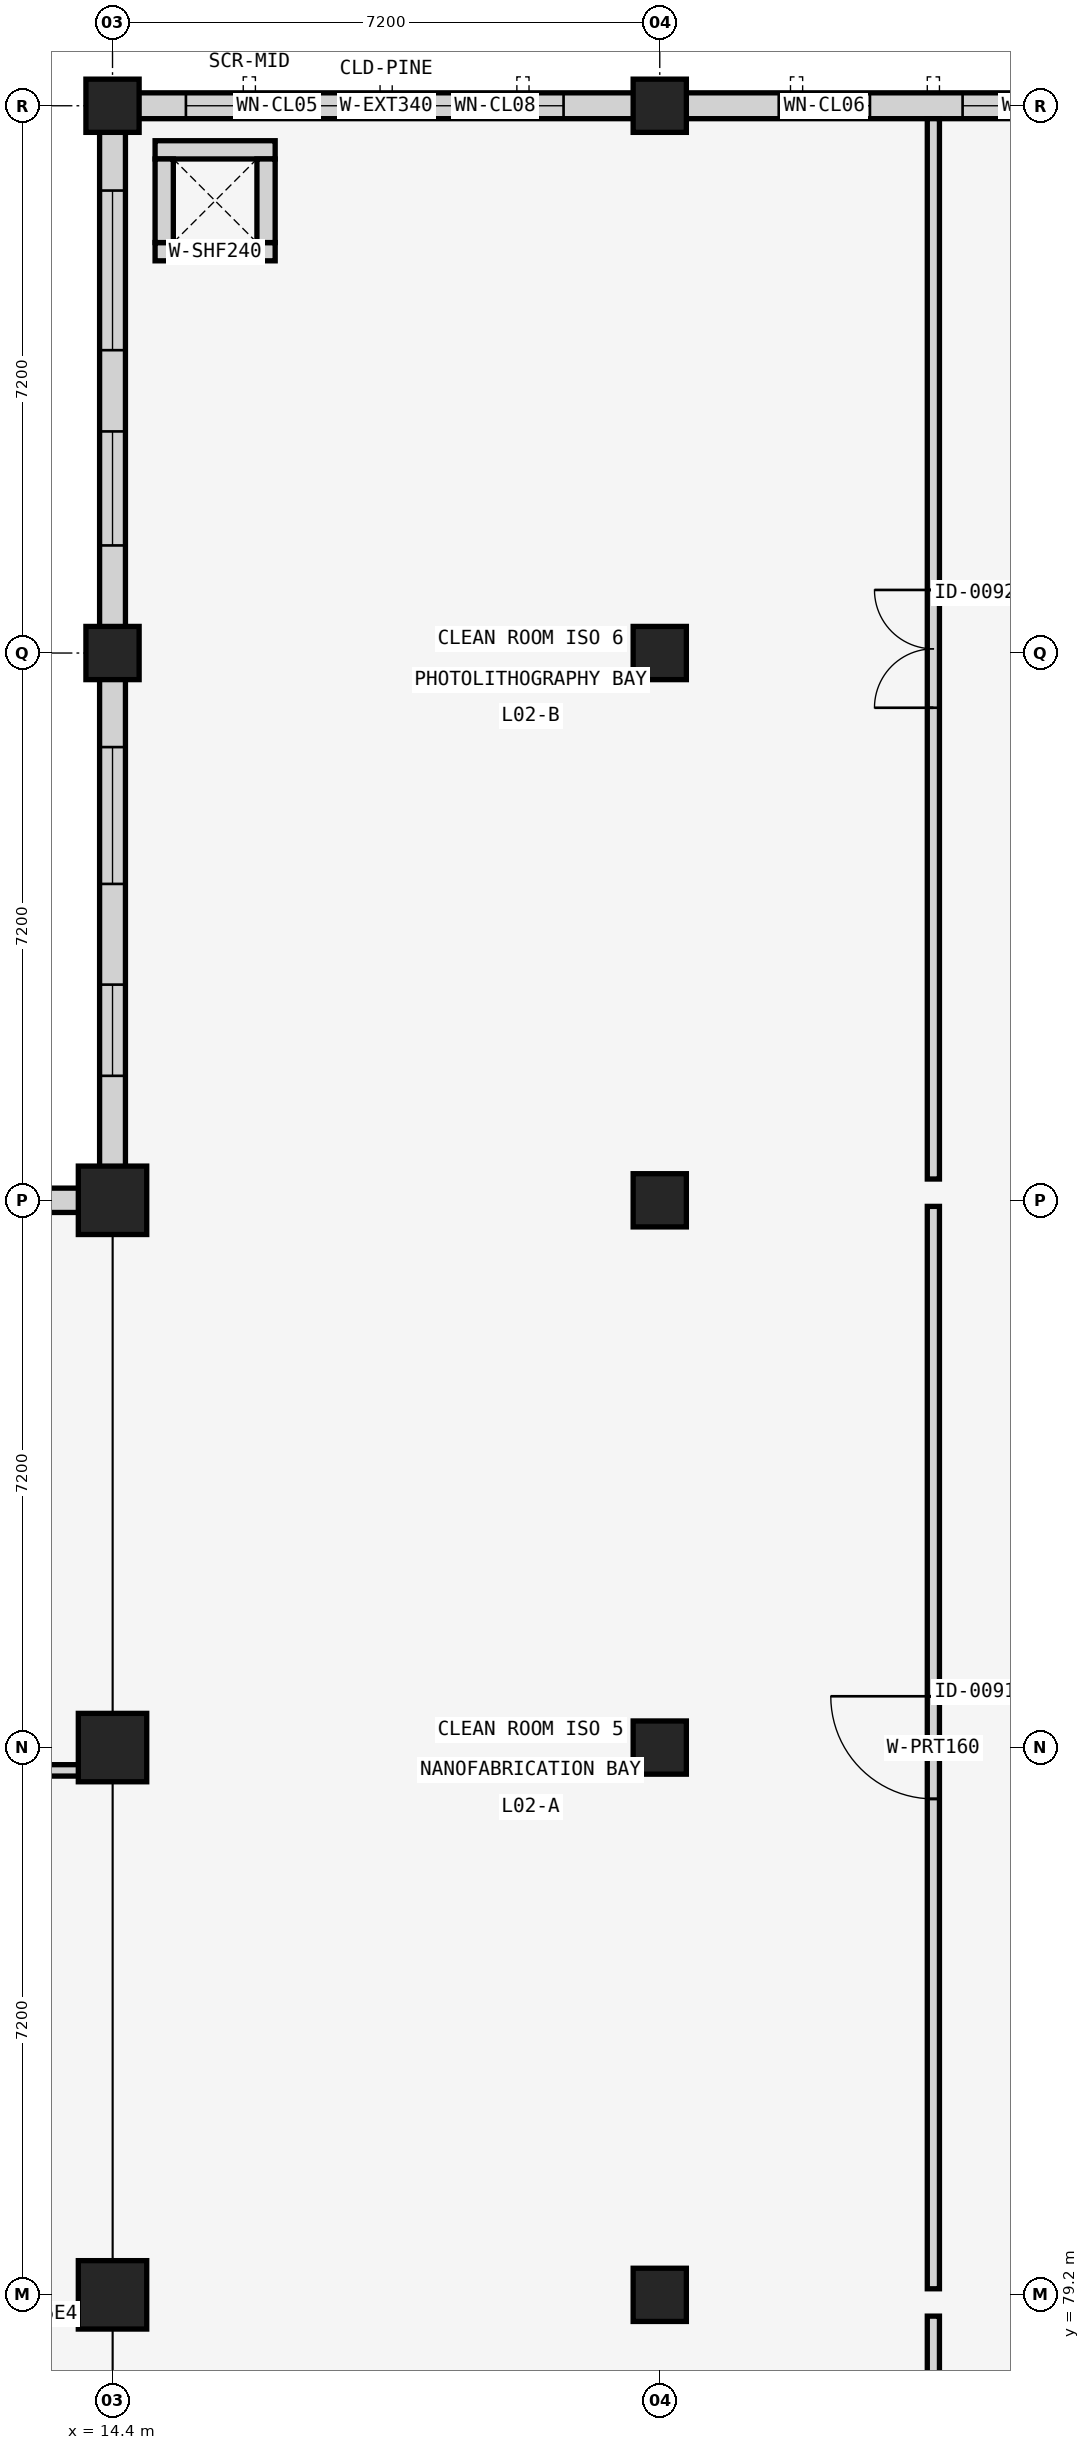
"""IFC4 building model, lengths in metres.
Left out: names, types, materials, properties, quantities, classifications, styles, units other than length and angle.
Written with IfcOpenShell. Run it as: python <this file> out.ifc"""

import sys

from ifc_helpers import new_model, si_unit, direction, frame, frame_2d, origin, origin_2d, place, context, subcontext, project, spatial, rectangle, extrude, element, fill, save


model = new_model("IFC4")
c1 = context("Model", 3, precision=1e-05, world=origin(), true_north=direction((0.0, 1.0)))
c2 = subcontext(c1, "Body", "Model", "MODEL_VIEW")
j1 = project(units=[si_unit("LENGTHUNIT", "METRE"), si_unit("PLANEANGLEUNIT", "RADIAN")], contexts=[c1])
p1 = place(None, origin())
s1 = spatial("IfcSite", under=j1, at=p1, CompositionType="ELEMENT")
p2 = place(p1, origin())
s2 = spatial("IfcBuilding", under=s1, at=p2, CompositionType="ELEMENT")
p3 = place(p2, frame((0.0, 0.0, 8.96)))
s3 = spatial("IfcBuildingStorey", under=s2, at=p3, CompositionType="ELEMENT", Elevation=8.96)
for number, where, z_axis, x_axis in (
    (1, (14.4, 79.2, 0.0), (0.0, 0.0, 1.0), (1.0, 0.0, 0.0)),
    (2, (14.4, 86.4, 0.0), (0.0, 0.0, 1.0), (1.0, 0.0, 0.0)),
    (3, (14.4, 93.6, 0.0), (0.0, 0.0, 1.0), (1.0, 0.0, 0.0)),
):
    element("IfcColumn", number, at=place(p3, frame(where, z_axis=z_axis, x_axis=x_axis)), inside=s3, PredefinedType="COLUMN", context=c2, shape_type="SweptSolid", body=[
        extrude(rectangle(XDim=0.9, YDim=0.9, at=origin_2d()), origin(), (0.0, 0.0, 1.0), 4.16),
    ])
for number, where, z_axis, x_axis in (
    (4, (14.4, 100.8, 0.0), (0.0, 0.0, 1.0), (1.0, 0.0, 0.0)),
    (5, (14.4, 108.0, 0.0), (0.0, 0.0, 1.0), (1.0, 0.0, 0.0)),
    (6, (21.6, 79.2, 0.0), (0.0, 0.0, 1.0), (1.0, 0.0, 0.0)),
    (7, (21.6, 86.4, 0.0), (0.0, 0.0, 1.0), (1.0, 0.0, 0.0)),
    (8, (21.6, 93.6, 0.0), (0.0, 0.0, 1.0), (1.0, 0.0, 0.0)),
    (9, (21.6, 100.8, 0.0), (0.0, 0.0, 1.0), (1.0, 0.0, 0.0)),
    (10, (21.6, 108.0, 0.0), (0.0, 0.0, 1.0), (1.0, 0.0, 0.0)),
):
    element("IfcColumn", number, at=place(p3, frame(where, z_axis=z_axis, x_axis=x_axis)), inside=s3, PredefinedType="COLUMN", context=c2, shape_type="SweptSolid", body=[
        extrude(rectangle(XDim=0.7, YDim=0.7, at=origin_2d()), origin(), (0.0, 0.0, 1.0), 4.16),
    ])
p4 = place(p3, frame((0.44, 93.6, 0.0), z_axis=(0.0, 0.0, 1.0), x_axis=(1.0, 0.0, 0.0)))
e11 = element("IfcWall", 11, at=p4, inside=s3, PredefinedType="SOLIDWALL", context=c2, shape_type="SweptSolid", body=[
    extrude(rectangle(XDim=13.52, YDim=0.32, at=frame_2d((6.76, 0.0))), origin(), (0.0, 0.0, 1.0), 3.42),
])
p5 = place(p4, frame((2.175, 0.0, 0.85)))
e12 = element("IfcOpeningElement", 12, at=p5, cuts=e11, PredefinedType="OPENING", context=c2, shape_type="SweptSolid", body=[
    extrude(rectangle(XDim=0.45, YDim=2.1, at=frame_2d((0.225, 1.05))), frame((0.0, 0.17, 0.0), z_axis=(0.0, -1.0, 0.0), x_axis=(1.0, 0.0, 0.0)), (0.0, 0.0, 1.0), 0.34),
])
p6 = place(p4, frame((4.975, 0.0, 0.85)))
e13 = element("IfcOpeningElement", 13, at=p6, cuts=e11, PredefinedType="OPENING", context=c2, shape_type="SweptSolid", body=[
    extrude(rectangle(XDim=0.45, YDim=2.4, at=frame_2d((0.225, 1.2))), frame((0.0, 0.17, 0.0), z_axis=(0.0, -1.0, 0.0), x_axis=(1.0, 0.0, 0.0)), (0.0, 0.0, 1.0), 0.34),
])
p7 = place(p4, frame((8.95, 0.0, 0.85)))
e14 = element("IfcOpeningElement", 14, at=p7, cuts=e11, PredefinedType="OPENING", context=c2, shape_type="SweptSolid", body=[
    extrude(rectangle(XDim=0.5, YDim=2.4, at=frame_2d((0.25, 1.2))), frame((0.0, 0.17, 0.0), z_axis=(0.0, -1.0, 0.0), x_axis=(1.0, 0.0, 0.0)), (0.0, 0.0, 1.0), 0.34),
])
p8 = place(p4, frame((11.725, 0.0, 0.85)))
e15 = element("IfcOpeningElement", 15, at=p8, cuts=e11, PredefinedType="OPENING", context=c2, shape_type="SweptSolid", body=[
    extrude(rectangle(XDim=0.55, YDim=2.2, at=frame_2d((0.275, 1.1))), frame((0.0, 0.17, 0.0), z_axis=(0.0, -1.0, 0.0), x_axis=(1.0, 0.0, 0.0)), (0.0, 0.0, 1.0), 0.34),
])
p9 = place(p3, frame((14.74, 108.0, 0.0), z_axis=(0.0, 0.0, 1.0), x_axis=(1.0, 0.0, 0.0)))
e16 = element("IfcWall", 16, at=p9, inside=s3, PredefinedType="SOLIDWALL", context=c2, shape_type="SweptSolid", body=[
    extrude(rectangle(XDim=6.52, YDim=0.34, at=frame_2d((3.26, 0.0))), origin(), (0.0, 0.0, 1.0), 3.42),
])
p10 = place(p9, frame((0.625, 0.0, 1.0)))
e17 = element("IfcOpeningElement", 17, at=p10, cuts=e16, PredefinedType="OPENING", context=c2, shape_type="SweptSolid", body=[
    extrude(rectangle(XDim=2.4, YDim=1.5, at=frame_2d((1.2, 0.75))), frame((0.0, 0.18, 0.0), z_axis=(0.0, -1.0, 0.0), x_axis=(1.0, 0.0, 0.0)), (0.0, 0.0, 1.0), 0.36),
])
p11 = place(p9, frame((3.794, 0.0, 1.0)))
e18 = element("IfcOpeningElement", 18, at=p11, cuts=e16, PredefinedType="OPENING", context=c2, shape_type="SweptSolid", body=[
    extrude(rectangle(XDim=1.8, YDim=1.65, at=frame_2d((0.9, 0.825))), frame((0.0, 0.18, 0.0), z_axis=(0.0, -1.0, 0.0), x_axis=(1.0, 0.0, 0.0)), (0.0, 0.0, 1.0), 0.36),
])
p12 = place(p3, frame((21.94, 108.0, 0.0), z_axis=(0.0, 0.0, 1.0), x_axis=(1.0, 0.0, 0.0)))
e19 = element("IfcWall", 19, at=p12, inside=s3, PredefinedType="SOLIDWALL", context=c2, shape_type="SweptSolid", body=[
    extrude(rectangle(XDim=6.52, YDim=0.34, at=frame_2d((3.26, 0.0))), origin(), (0.0, 0.0, 1.0), 3.21),
])
p13 = place(p12, frame((1.226, 0.0, 1.0)))
e20 = element("IfcOpeningElement", 20, at=p13, cuts=e19, PredefinedType="OPENING", context=c2, shape_type="SweptSolid", body=[
    extrude(rectangle(XDim=1.2, YDim=1.65, at=frame_2d((0.6, 0.825))), frame((0.0, 0.18, 0.0), z_axis=(0.0, -1.0, 0.0), x_axis=(1.0, 0.0, 0.0)), (0.0, 0.0, 1.0), 0.36),
])
p14 = place(p12, frame((3.644, 0.0, 1.0)))
e21 = element("IfcOpeningElement", 21, at=p14, cuts=e19, PredefinedType="OPENING", context=c2, shape_type="SweptSolid", body=[
    extrude(rectangle(XDim=2.1, YDim=1.65, at=frame_2d((1.05, 0.825))), frame((0.0, 0.18, 0.0), z_axis=(0.0, -1.0, 0.0), x_axis=(1.0, 0.0, 0.0)), (0.0, 0.0, 1.0), 0.36),
])
p15 = place(p3, frame((14.4, 94.04, 0.0), z_axis=(0.0, 0.0, 1.0), x_axis=(0.0, 1.0, 0.0)))
e22 = element("IfcWall", 22, at=p15, inside=s3, PredefinedType="SOLIDWALL", context=c2, shape_type="SweptSolid", body=[
    extrude(rectangle(XDim=6.42, YDim=0.34, at=frame_2d((3.21, 0.0))), origin(), (0.0, 0.0, 1.0), 3.21),
])
p16 = place(p15, frame((1.198, 0.0, 1.0)))
e23 = element("IfcOpeningElement", 23, at=p16, cuts=e22, PredefinedType="OPENING", context=c2, shape_type="SweptSolid", body=[
    extrude(rectangle(XDim=1.2, YDim=1.65, at=frame_2d((0.6, 0.825))), frame((0.0, 0.18, 0.0), z_axis=(0.0, -1.0, 0.0), x_axis=(1.0, 0.0, 0.0)), (0.0, 0.0, 1.0), 0.36),
])
p17 = place(p15, frame((3.722, 0.0, 1.0)))
e24 = element("IfcOpeningElement", 24, at=p17, cuts=e22, PredefinedType="OPENING", context=c2, shape_type="SweptSolid", body=[
    extrude(rectangle(XDim=1.8, YDim=1.65, at=frame_2d((0.9, 0.825))), frame((0.0, 0.18, 0.0), z_axis=(0.0, -1.0, 0.0), x_axis=(1.0, 0.0, 0.0)), (0.0, 0.0, 1.0), 0.36),
])
p18 = place(p3, frame((14.4, 101.14, 0.0), z_axis=(0.0, 0.0, 1.0), x_axis=(0.0, 1.0, 0.0)))
e25 = element("IfcWall", 25, at=p18, inside=s3, PredefinedType="SOLIDWALL", context=c2, shape_type="SweptSolid", body=[
    extrude(rectangle(XDim=6.52, YDim=0.34, at=frame_2d((3.26, 0.0))), origin(), (0.0, 0.0, 1.0), 3.21),
])
p19 = place(p18, frame((1.076, 0.0, 1.0)))
e26 = element("IfcOpeningElement", 26, at=p19, cuts=e25, PredefinedType="OPENING", context=c2, shape_type="SweptSolid", body=[
    extrude(rectangle(XDim=1.5, YDim=1.65, at=frame_2d((0.75, 0.825))), frame((0.0, 0.18, 0.0), z_axis=(0.0, -1.0, 0.0), x_axis=(1.0, 0.0, 0.0)), (0.0, 0.0, 1.0), 0.36),
])
p20 = place(p18, frame((3.644, 0.0, 1.0)))
e27 = element("IfcOpeningElement", 27, at=p20, cuts=e25, PredefinedType="OPENING", context=c2, shape_type="SweptSolid", body=[
    extrude(rectangle(XDim=2.1, YDim=1.65, at=frame_2d((1.05, 0.825))), frame((0.0, 0.18, 0.0), z_axis=(0.0, -1.0, 0.0), x_axis=(1.0, 0.0, 0.0)), (0.0, 0.0, 1.0), 0.36),
])
p21 = place(p3, frame((0.25, 86.1, 0.0), z_axis=(0.0, 0.0, 1.0), x_axis=(1.0, 0.0, 0.0)))
e28 = element("IfcWall", 28, at=p21, inside=s3, PredefinedType="PARTITIONING", context=c2, shape_type="SweptSolid", body=[
    extrude(rectangle(XDim=13.925, YDim=0.15, at=frame_2d((6.962, 0.0))), origin(), (0.0, 0.0, 1.0), 3.21),
])
p22 = place(p21, frame((4.074, 0.0, 0.0)))
e29 = element("IfcOpeningElement", 29, at=p22, cuts=e28, PredefinedType="OPENING", context=c2, shape_type="SweptSolid", body=[
    extrude(rectangle(XDim=1.6, YDim=2.25, at=frame_2d((0.8, 1.125))), frame((0.0, 0.085, 0.0), z_axis=(0.0, -1.0, 0.0), x_axis=(1.0, 0.0, 0.0)), (0.0, 0.0, 1.0), 0.17),
])
p23 = place(p3, frame((25.2, 65.18, 0.0), z_axis=(0.0, 0.0, 1.0), x_axis=(0.0, 1.0, 0.0)))
e30 = element("IfcWall", 30, at=p23, inside=s3, PredefinedType="PARTITIONING", context=c2, shape_type="SweptSolid", body=[
    extrude(rectangle(XDim=13.74, YDim=0.16, at=frame_2d((6.87, 0.0))), origin(), (0.0, 0.0, 1.0), 3.16),
])
p24 = place(p23, frame((6.27, 0.0, 0.0)))
e31 = element("IfcOpeningElement", 31, at=p24, cuts=e30, PredefinedType="OPENING", context=c2, shape_type="SweptSolid", body=[
    extrude(rectangle(XDim=1.2, YDim=2.15, at=frame_2d((0.6, 1.075))), frame((0.0, 0.09, 0.0), z_axis=(0.0, -1.0, 0.0), x_axis=(1.0, 0.0, 0.0)), (0.0, 0.0, 1.0), 0.18),
])
p25 = place(p3, frame((25.2, 79.28, 0.0), z_axis=(0.0, 0.0, 1.0), x_axis=(0.0, 1.0, 0.0)))
e32 = element("IfcWall", 32, at=p25, inside=s3, PredefinedType="PARTITIONING", context=c2, shape_type="SweptSolid", body=[
    extrude(rectangle(XDim=14.24, YDim=0.16, at=frame_2d((7.12, 0.0))), origin(), (0.0, 0.0, 1.0), 3.16),
])
p26 = place(p25, frame((6.445, 0.0, 0.0)))
e33 = element("IfcOpeningElement", 33, at=p26, cuts=e32, PredefinedType="OPENING", context=c2, shape_type="SweptSolid", body=[
    extrude(rectangle(XDim=1.35, YDim=2.2, at=frame_2d((0.675, 1.1))), frame((0.0, 0.09, 0.0), z_axis=(0.0, -1.0, 0.0), x_axis=(1.0, 0.0, 0.0)), (0.0, 0.0, 1.0), 0.18),
])
p27 = place(p3, frame((25.2, 93.88, 0.0), z_axis=(0.0, 0.0, 1.0), x_axis=(0.0, 1.0, 0.0)))
e34 = element("IfcWall", 34, at=p27, inside=s3, PredefinedType="PARTITIONING", context=c2, shape_type="SweptSolid", body=[
    extrude(rectangle(XDim=13.95, YDim=0.16, at=frame_2d((6.975, 0.0))), origin(), (0.0, 0.0, 1.0), 3.16),
])
p28 = place(p27, frame((6.2, 0.0, 0.0)))
e35 = element("IfcOpeningElement", 35, at=p28, cuts=e34, PredefinedType="OPENING", context=c2, shape_type="SweptSolid", body=[
    extrude(rectangle(XDim=1.55, YDim=2.25, at=frame_2d((0.775, 1.125))), frame((0.0, 0.09, 0.0), z_axis=(0.0, -1.0, 0.0), x_axis=(1.0, 0.0, 0.0)), (0.0, 0.0, 1.0), 0.18),
])
for number, where, z_axis, x_axis in (
    (36, (14.96, 106.08, 0.0), (0.0, 0.0, 1.0), (1.0, 0.0, 0.0)),
    (37, (14.96, 107.42, 0.0), (0.0, 0.0, 1.0), (1.0, 0.0, 0.0)),
):
    element("IfcWall", number, at=place(p3, frame(where, z_axis=z_axis, x_axis=x_axis)), inside=s3, PredefinedType="SOLIDWALL", context=c2, shape_type="SweptSolid", body=[
        extrude(rectangle(XDim=1.58, YDim=0.24, at=frame_2d((0.79, 0.0))), origin(), (0.0, 0.0, 1.0), 3.81),
    ])
for number, where, z_axis, x_axis in (
    (38, (15.08, 106.2, 0.0), (0.0, 0.0, 1.0), (0.0, 1.0, 0.0)),
    (39, (16.42, 106.2, 0.0), (0.0, 0.0, 1.0), (0.0, 1.0, 0.0)),
):
    element("IfcWall", number, at=place(p3, frame(where, z_axis=z_axis, x_axis=x_axis)), inside=s3, PredefinedType="SOLIDWALL", context=c2, shape_type="SweptSolid", body=[
        extrude(rectangle(XDim=1.1, YDim=0.24, at=frame_2d((0.55, 0.0))), origin(), (0.0, 0.0, 1.0), 3.81),
    ])
p29 = place(p10, origin())
e40 = element("IfcWindow", 40, at=p29, inside=s3, PartitioningType="SINGLE_PANEL", PredefinedType="WINDOW", context=c2, shape_type="SweptSolid", body=[
    extrude(rectangle(XDim=2.4, YDim=1.5, at=frame_2d((1.2, 0.75))), frame((0.0, 0.03, 0.0), z_axis=(0.0, -1.0, 0.0), x_axis=(1.0, 0.0, 0.0)), (0.0, 0.0, 1.0), 0.06),
])
fill(e17, e40)
p30 = place(p11, origin())
e41 = element("IfcWindow", 41, at=p30, inside=s3, PartitioningType="SINGLE_PANEL", PredefinedType="WINDOW", context=c2, shape_type="SweptSolid", body=[
    extrude(rectangle(XDim=1.8, YDim=1.65, at=frame_2d((0.9, 0.825))), frame((0.0, 0.03, 0.0), z_axis=(0.0, -1.0, 0.0), x_axis=(1.0, 0.0, 0.0)), (0.0, 0.0, 1.0), 0.06),
])
fill(e18, e41)
p31 = place(p13, origin())
e42 = element("IfcWindow", 42, at=p31, inside=s3, PartitioningType="SINGLE_PANEL", PredefinedType="WINDOW", context=c2, shape_type="SweptSolid", body=[
    extrude(rectangle(XDim=1.2, YDim=1.65, at=frame_2d((0.6, 0.825))), frame((0.0, 0.03, 0.0), z_axis=(0.0, -1.0, 0.0), x_axis=(1.0, 0.0, 0.0)), (0.0, 0.0, 1.0), 0.06),
])
fill(e20, e42)
p32 = place(p14, origin())
e43 = element("IfcWindow", 43, at=p32, inside=s3, PartitioningType="SINGLE_PANEL", PredefinedType="WINDOW", context=c2, shape_type="SweptSolid", body=[
    extrude(rectangle(XDim=2.1, YDim=1.65, at=frame_2d((1.05, 0.825))), frame((0.0, 0.03, 0.0), z_axis=(0.0, -1.0, 0.0), x_axis=(1.0, 0.0, 0.0)), (0.0, 0.0, 1.0), 0.06),
])
fill(e21, e43)
p33 = place(p16, origin())
e44 = element("IfcWindow", 44, at=p33, inside=s3, PartitioningType="SINGLE_PANEL", PredefinedType="WINDOW", context=c2, shape_type="SweptSolid", body=[
    extrude(rectangle(XDim=1.2, YDim=1.65, at=frame_2d((0.6, 0.825))), frame((0.0, 0.03, 0.0), z_axis=(0.0, -1.0, 0.0), x_axis=(1.0, 0.0, 0.0)), (0.0, 0.0, 1.0), 0.06),
])
fill(e23, e44)
p34 = place(p17, origin())
e45 = element("IfcWindow", 45, at=p34, inside=s3, PartitioningType="SINGLE_PANEL", PredefinedType="WINDOW", context=c2, shape_type="SweptSolid", body=[
    extrude(rectangle(XDim=1.8, YDim=1.65, at=frame_2d((0.9, 0.825))), frame((0.0, 0.03, 0.0), z_axis=(0.0, -1.0, 0.0), x_axis=(1.0, 0.0, 0.0)), (0.0, 0.0, 1.0), 0.06),
])
fill(e24, e45)
p35 = place(p19, origin())
e46 = element("IfcWindow", 46, at=p35, inside=s3, PartitioningType="SINGLE_PANEL", PredefinedType="WINDOW", context=c2, shape_type="SweptSolid", body=[
    extrude(rectangle(XDim=1.5, YDim=1.65, at=frame_2d((0.75, 0.825))), frame((0.0, 0.03, 0.0), z_axis=(0.0, -1.0, 0.0), x_axis=(1.0, 0.0, 0.0)), (0.0, 0.0, 1.0), 0.06),
])
fill(e26, e46)
p36 = place(p20, origin())
e47 = element("IfcWindow", 47, at=p36, inside=s3, PartitioningType="SINGLE_PANEL", PredefinedType="WINDOW", context=c2, shape_type="SweptSolid", body=[
    extrude(rectangle(XDim=2.1, YDim=1.65, at=frame_2d((1.05, 0.825))), frame((0.0, 0.03, 0.0), z_axis=(0.0, -1.0, 0.0), x_axis=(1.0, 0.0, 0.0)), (0.0, 0.0, 1.0), 0.06),
])
fill(e27, e47)
p37 = place(p26, origin())
e48 = element("IfcDoor", 48, at=p37, inside=s3, OperationType="SINGLE_SWING_RIGHT", PredefinedType="DOOR", context=c2, shape_type="SweptSolid", body=[
    extrude(rectangle(XDim=1.35, YDim=2.2, at=frame_2d((0.675, 1.1))), frame((0.0, 0.025, 0.0), z_axis=(0.0, -1.0, 0.0), x_axis=(1.0, 0.0, 0.0)), (0.0, 0.0, 1.0), 0.05),
])
fill(e33, e48)
p38 = place(p28, origin())
e49 = element("IfcDoor", 49, at=p38, inside=s3, OperationType="DOUBLE_DOOR_SINGLE_SWING", PredefinedType="DOOR", context=c2, shape_type="SweptSolid", body=[
    extrude(rectangle(XDim=1.55, YDim=2.25, at=frame_2d((0.775, 1.125))), frame((0.0, 0.025, 0.0), z_axis=(0.0, -1.0, 0.0), x_axis=(1.0, 0.0, 0.0)), (0.0, 0.0, 1.0), 0.05),
])
fill(e35, e49)
save(model, sys.argv[1])
